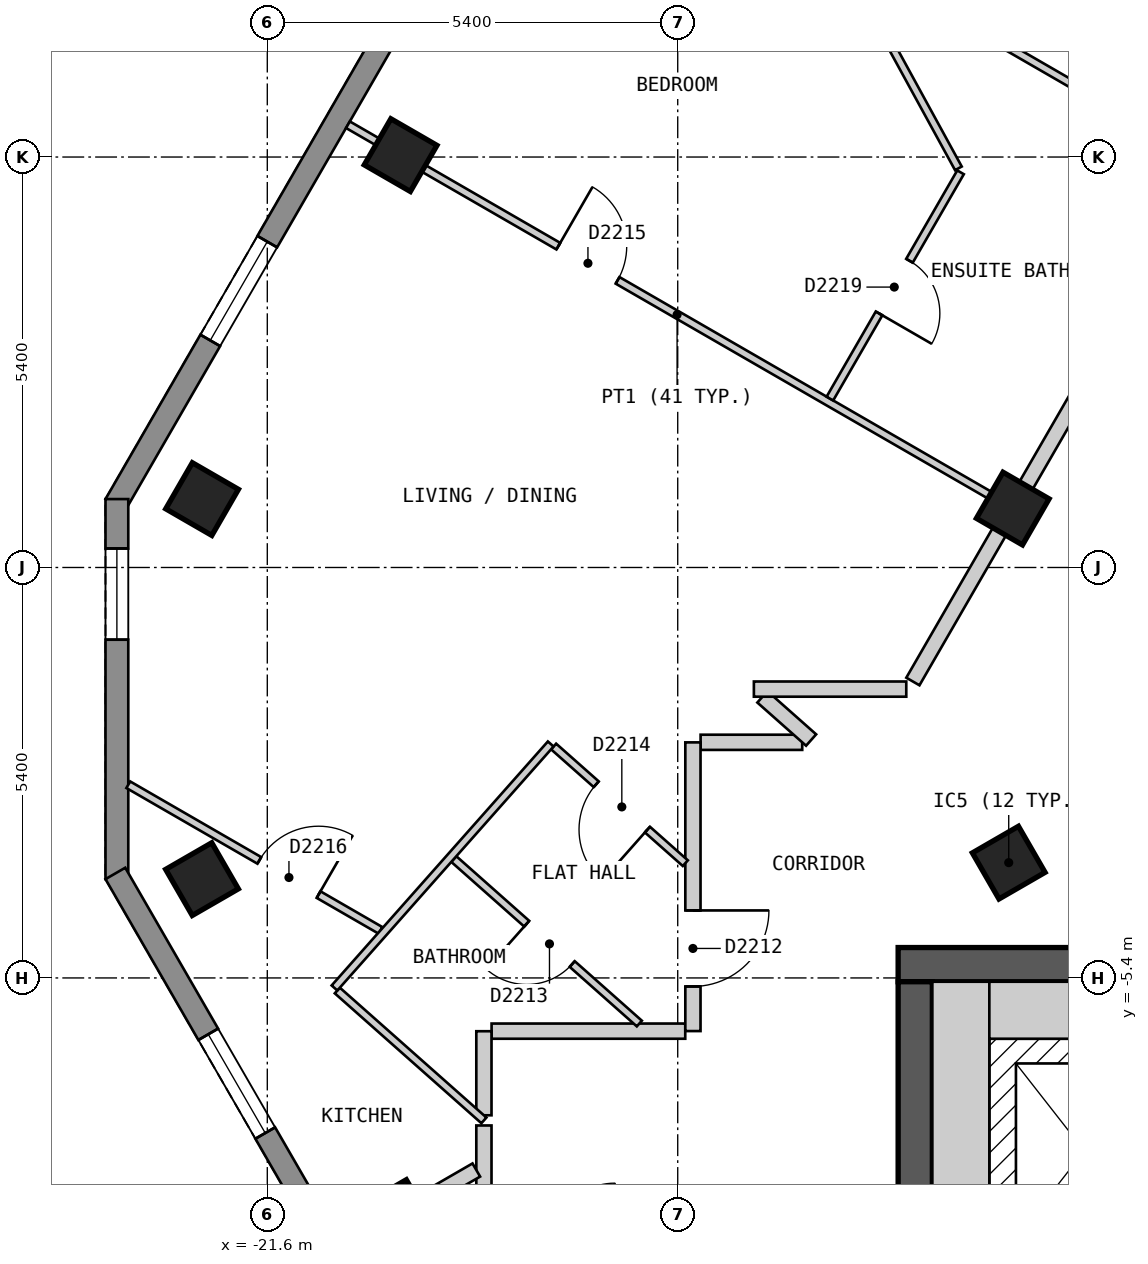
"""IFC4 building model, lengths in metres.
Left out: names, types, materials, properties, quantities, classifications, styles, units other than length and angle.
Written with IfcOpenShell. Run it as: python <this file> out.ifc"""

import sys

from ifc_helpers import new_model, si_unit, direction, frame, frame_2d, origin, origin_2d, place, context, subcontext, project, spatial, polyline, rectangle, outline, extrude, element, fill, save


model = new_model("IFC4")
c1 = context("Model", 3, precision=1e-05, world=origin(), true_north=direction((0.0, 1.0)))
c2 = subcontext(c1, "Body", "Model", "MODEL_VIEW")
j1 = project(units=[si_unit("LENGTHUNIT", "METRE"), si_unit("PLANEANGLEUNIT", "RADIAN")], contexts=[c1])
p1 = place(None, origin())
s1 = spatial("IfcSite", under=j1, at=p1, CompositionType="ELEMENT")
p2 = place(p1, origin())
s2 = spatial("IfcBuilding", under=s1, at=p2, CompositionType="ELEMENT")
p3 = place(p2, frame((0.0, 0.0, 223.8)))
s3 = spatial("IfcBuildingStorey", under=s2, at=p3, CompositionType="ELEMENT", Elevation=223.8)
for number, where, z_axis, x_axis in (
    (1, (-19.846, 5.425, 0.0), (0.0, 0.0, 1.0), (-0.5, -0.866, 0.0)),
    (2, (-22.458, 0.9, 0.0), (0.0, 0.0, 1.0), (-0.5, -0.866, 0.0)),
    (3, (-22.459, -4.1, 0.0), (0.0, 0.0, 1.0), (0.5, -0.866, 0.0)),
    (4, (-19.899, -8.533, 0.0), (0.0, 0.0, 1.0), (0.5, -0.866, 0.0)),
    (5, (-11.845, -3.883, 0.0), (0.0, 0.0, 1.0), (0.5, -0.866, 0.0)),
    (6, (-11.792, 0.775, 0.0), (0.0, 0.0, 1.0), (-0.5, -0.866, 0.0)),
):
    element("IfcColumn", number, at=place(p3, frame(where, z_axis=z_axis, x_axis=x_axis)), inside=s3, PredefinedType="COLUMN", context=c2, shape_type="SweptSolid", body=[
        extrude(rectangle(XDim=0.7, YDim=0.7, at=origin_2d()), origin(), (0.0, 0.0, 1.0), 3.0),
    ])
p4 = place(p3, frame((-13.3, -5.225, 0.0), z_axis=(0.0, 0.0, 1.0), x_axis=(1.0, 0.0, 0.0)))
e7 = element("IfcWall", 7, at=p4, inside=s3, PredefinedType="SHEAR", context=c2, shape_type="SweptSolid", body=[
    extrude(rectangle(XDim=26.6, YDim=0.45, at=frame_2d((13.3, 0.0))), origin(), (0.0, 0.0, 1.0), 2.7),
])
p5 = place(p4, frame((23.65, 0.0, 0.0)))
e8 = element("IfcOpeningElement", 8, at=p5, cuts=e7, PredefinedType="OPENING", context=c2, shape_type="SweptSolid", body=[
    extrude(rectangle(XDim=1.2, YDim=2.1, at=frame_2d((0.6, 1.05))), frame((0.0, 0.235, 0.0), z_axis=(0.0, -1.0, 0.0), x_axis=(1.0, 0.0, 0.0)), (0.0, 0.0, 1.0), 0.47),
])
p6 = place(p3, frame((-13.075, -18.55, 0.0), z_axis=(0.0, 0.0, 1.0), x_axis=(0.0, 1.0, 0.0)))
e9 = element("IfcWall", 9, at=p6, inside=s3, PredefinedType="SHEAR", context=c2, shape_type="SweptSolid", body=[
    extrude(rectangle(XDim=13.1, YDim=0.45, at=frame_2d((6.55, 0.0))), origin(), (0.0, 0.0, 1.0), 2.7),
])
p7 = place(p6, frame((4.35, 0.0, 0.0)))
e10 = element("IfcOpeningElement", 10, at=p7, cuts=e9, PredefinedType="OPENING", context=c2, shape_type="SweptSolid", body=[
    extrude(rectangle(XDim=1.2, YDim=2.1, at=frame_2d((0.6, 1.05))), frame((0.0, 0.235, 0.0), z_axis=(0.0, -1.0, 0.0), x_axis=(1.0, 0.0, 0.0)), (0.0, 0.0, 1.0), 0.47),
])
p8 = place(p3, frame((-12.514, 20.025, 0.0), z_axis=(0.0, 0.0, 1.0), x_axis=(-0.500003656944, -0.866023292436, 0.0)))
e11 = element("IfcWall", 11, at=p8, inside=s3, PredefinedType="SOLIDWALL", context=c2, shape_type="SweptSolid", body=[
    extrude(outline(polyline([(0.0, -0.15), (22.17, -0.15), (22.09, 0.15), (0.08, 0.15), (0.0, -0.15)])), origin(), (0.0, 0.0, 1.0), 2.7),
])
p9 = place(p8, frame((2.497, 0.0, 0.15)))
e12 = element("IfcOpeningElement", 12, at=p9, cuts=e11, PredefinedType="OPENING", context=c2, shape_type="SweptSolid", body=[
    extrude(rectangle(XDim=1.5, YDim=2.1, at=frame_2d((0.75, 1.05))), frame((0.0, 0.16, 0.0), z_axis=(0.0, -1.0, 0.0), x_axis=(1.0, 0.0, 0.0)), (0.0, 0.0, 1.0), 0.32),
])
p10 = place(p8, frame((7.722, 0.0, 0.15)))
e13 = element("IfcOpeningElement", 13, at=p10, cuts=e11, PredefinedType="OPENING", context=c2, shape_type="SweptSolid", body=[
    extrude(rectangle(XDim=1.5, YDim=2.1, at=frame_2d((0.75, 1.05))), frame((0.0, 0.16, 0.0), z_axis=(0.0, -1.0, 0.0), x_axis=(1.0, 0.0, 0.0)), (0.0, 0.0, 1.0), 0.32),
])
p11 = place(p8, frame((12.948, 0.0, 0.15)))
e14 = element("IfcOpeningElement", 14, at=p11, cuts=e11, PredefinedType="OPENING", context=c2, shape_type="SweptSolid", body=[
    extrude(rectangle(XDim=1.5, YDim=2.1, at=frame_2d((0.75, 1.05))), frame((0.0, 0.16, 0.0), z_axis=(0.0, -1.0, 0.0), x_axis=(1.0, 0.0, 0.0)), (0.0, 0.0, 1.0), 0.32),
])
p12 = place(p8, frame((18.173, 0.0, 0.15)))
e15 = element("IfcOpeningElement", 15, at=p12, cuts=e11, PredefinedType="OPENING", context=c2, shape_type="SweptSolid", body=[
    extrude(rectangle(XDim=1.5, YDim=2.1, at=frame_2d((0.75, 1.05))), frame((0.0, 0.16, 0.0), z_axis=(0.0, -1.0, 0.0), x_axis=(1.0, 0.0, 0.0)), (0.0, 0.0, 1.0), 0.32),
])
p13 = place(p3, frame((-23.579, 0.9, 0.0), z_axis=(0.0, 0.0, 1.0), x_axis=(0.0, -1.0, 0.0)))
e16 = element("IfcWall", 16, at=p13, inside=s3, PredefinedType="SOLIDWALL", context=c2, shape_type="SweptSolid", body=[
    extrude(outline(polyline([(0.0, -0.15), (5.0, -0.15), (4.92, 0.15), (0.08, 0.15), (0.0, -0.15)])), origin(), (0.0, 0.0, 1.0), 2.7),
])
p14 = place(p13, frame((0.65, 0.0, 0.15)))
e17 = element("IfcOpeningElement", 17, at=p14, cuts=e16, PredefinedType="OPENING", context=c2, shape_type="SweptSolid", body=[
    extrude(rectangle(XDim=1.2, YDim=2.1, at=frame_2d((0.6, 1.05))), frame((0.0, 0.16, 0.0), z_axis=(0.0, -1.0, 0.0), x_axis=(1.0, 0.0, 0.0)), (0.0, 0.0, 1.0), 0.32),
])
p15 = place(p3, frame((-23.599, -4.025, 0.0), z_axis=(0.0, 0.0, 1.0), x_axis=(0.500012653391, -0.866018098222, 0.0)))
e18 = element("IfcWall", 18, at=p15, inside=s3, PredefinedType="SOLIDWALL", context=c2, shape_type="SweptSolid", body=[
    extrude(outline(polyline([(0.0, -0.15), (16.628, -0.15), (16.548, 0.15), (0.08, 0.15), (0.0, -0.15)])), origin(), (0.0, 0.0, 1.0), 2.7),
])
p16 = place(p15, frame((2.444, 0.0, 0.15)))
e19 = element("IfcOpeningElement", 19, at=p16, cuts=e18, PredefinedType="OPENING", context=c2, shape_type="SweptSolid", body=[
    extrude(rectangle(XDim=1.5, YDim=2.1, at=frame_2d((0.75, 1.05))), frame((0.0, 0.16, 0.0), z_axis=(0.0, -1.0, 0.0), x_axis=(1.0, 0.0, 0.0)), (0.0, 0.0, 1.0), 0.32),
])
p17 = place(p15, frame((7.564, 0.0, 0.15)))
e20 = element("IfcOpeningElement", 20, at=p17, cuts=e18, PredefinedType="OPENING", context=c2, shape_type="SweptSolid", body=[
    extrude(rectangle(XDim=1.5, YDim=2.1, at=frame_2d((0.75, 1.05))), frame((0.0, 0.16, 0.0), z_axis=(0.0, -1.0, 0.0), x_axis=(1.0, 0.0, 0.0)), (0.0, 0.0, 1.0), 0.32),
])
p18 = place(p15, frame((12.682, 0.0, 0.15)))
e21 = element("IfcOpeningElement", 21, at=p18, cuts=e18, PredefinedType="OPENING", context=c2, shape_type="SweptSolid", body=[
    extrude(rectangle(XDim=1.5, YDim=2.1, at=frame_2d((0.75, 1.05))), frame((0.0, 0.16, 0.0), z_axis=(0.0, -1.0, 0.0), x_axis=(1.0, 0.0, 0.0)), (0.0, 0.0, 1.0), 0.32),
])
p19 = place(p3, frame((-18.75, -7.341, 0.0), z_axis=(0.0, 0.0, 1.0), x_axis=(0.0, -1.0, 0.0)))
e22 = element("IfcWall", 22, at=p19, inside=s3, PredefinedType="PARTITIONING", context=c2, shape_type="SweptSolid", body=[
    extrude(rectangle(XDim=1.458, YDim=0.2, at=frame_2d((0.729, 0.0))), origin(), (0.0, 0.0, 1.0), 2.7),
])
p20 = place(p3, frame((-18.649, -6.1, 0.0), z_axis=(0.0, 0.0, 1.0), x_axis=(1.0, 0.0, 0.0)))
e23 = element("IfcWall", 23, at=p20, inside=s3, PredefinedType="PARTITIONING", context=c2, shape_type="SweptSolid", body=[
    extrude(rectangle(XDim=2.548, YDim=0.2, at=frame_2d((1.274, 0.0))), origin(), (0.0, 0.0, 1.0), 2.7),
])
p21 = place(p3, frame((-15.899, -2.3, 0.0), z_axis=(0.0, 0.0, 1.0), x_axis=(1.0, 0.0, 0.0)))
e24 = element("IfcWall", 24, at=p21, inside=s3, PredefinedType="PARTITIONING", context=c2, shape_type="SweptSolid", body=[
    extrude(rectangle(XDim=1.337, YDim=0.2, at=frame_2d((0.668, 0.0))), origin(), (0.0, 0.0, 1.0), 2.7),
])
p22 = place(p3, frame((-13.106, -1.5, 0.0), z_axis=(0.0, 0.0, 1.0), x_axis=(0.500025705601, 0.86601056214, 0.0)))
e25 = element("IfcWall", 25, at=p22, inside=s3, PredefinedType="PARTITIONING", context=c2, shape_type="SweptSolid", body=[
    extrude(rectangle(XDim=7.735, YDim=0.2, at=frame_2d((3.868, 0.0))), origin(), (0.0, 0.0, 1.0), 2.7),
])
p23 = place(p3, frame((-16.0, -6.099, 0.0), z_axis=(0.0, 0.0, 1.0), x_axis=(0.0, 1.0, 0.0)))
e26 = element("IfcWall", 26, at=p23, inside=s3, PredefinedType="PARTITIONING", context=c2, shape_type="SweptSolid", body=[
    extrude(rectangle(XDim=3.798, YDim=0.2, at=frame_2d((1.899, 0.0))), origin(), (0.0, 0.0, 1.0), 2.7),
])
p24 = place(p23, frame((0.587, 0.0, 0.0)))
e27 = element("IfcOpeningElement", 27, at=p24, cuts=e26, PredefinedType="OPENING", context=c2, shape_type="SweptSolid", body=[
    extrude(rectangle(XDim=1.0, YDim=2.1, at=frame_2d((0.5, 1.05))), frame((0.0, 0.11, 0.0), z_axis=(0.0, -1.0, 0.0), x_axis=(1.0, 0.0, 0.0)), (0.0, 0.0, 1.0), 0.22),
])
p25 = place(p3, frame((-18.75, -7.207, 0.0), z_axis=(0.0, 0.0, 1.0), x_axis=(0.0, 1.0, 0.0)))
e28 = element("IfcWall", 28, at=p25, inside=s3, PredefinedType="PARTITIONING", context=c2, shape_type="SweptSolid", body=[
    extrude(rectangle(XDim=1.106, YDim=0.2, at=frame_2d((0.553, 0.0))), origin(), (0.0, 0.0, 1.0), 2.7),
])
p26 = place(p3, frame((-14.012, 8.0, 0.0), z_axis=(0.0, 0.0, 1.0), x_axis=(0.480183343847, -0.877168145963, 0.0)))
e29 = element("IfcWall", 29, at=p26, inside=s3, PredefinedType="PARTITIONING", context=c2, shape_type="SweptSolid", body=[
    extrude(rectangle(XDim=3.134, YDim=0.1, at=frame_2d((1.567, 0.0))), origin(), (0.0, 0.0, 1.0), 2.7),
])
p27 = place(p3, frame((-20.539, 5.825, 0.0), z_axis=(0.0, 0.0, 1.0), x_axis=(0.866089650643, -0.499888704662, 0.0)))
e30 = element("IfcWall", 30, at=p27, inside=s3, PredefinedType="PARTITIONING", context=c2, shape_type="SweptSolid", body=[
    extrude(rectangle(XDim=10.0, YDim=0.1, at=frame_2d((5.0, 0.0))), origin(), (0.0, 0.0, 1.0), 2.7),
])
p28 = place(p27, frame((3.196, 0.0, 0.0)))
e31 = element("IfcOpeningElement", 31, at=p28, cuts=e30, PredefinedType="OPENING", context=c2, shape_type="SweptSolid", body=[
    extrude(rectangle(XDim=0.9, YDim=2.1, at=frame_2d((0.45, 1.05))), frame((0.0, 0.06, 0.0), z_axis=(0.0, -1.0, 0.0), x_axis=(1.0, 0.0, 0.0)), (0.0, 0.0, 1.0), 0.12),
])
p29 = place(p3, frame((-23.429, -2.858, 0.0), z_axis=(0.0, 0.0, 1.0), x_axis=(0.8659754619, -0.500086491905, 0.0)))
e32 = element("IfcWall", 32, at=p29, inside=s3, PredefinedType="PARTITIONING", context=c2, shape_type="SweptSolid", body=[
    extrude(rectangle(XDim=3.831, YDim=0.1, at=frame_2d((1.916, 0.0))), origin(), (0.0, 0.0, 1.0), 2.7),
])
p30 = place(p29, frame((1.991, 0.0, 0.0)))
e33 = element("IfcOpeningElement", 33, at=p30, cuts=e32, PredefinedType="OPENING", context=c2, shape_type="SweptSolid", body=[
    extrude(rectangle(XDim=0.9, YDim=2.1, at=frame_2d((0.45, 1.05))), frame((0.0, 0.06, 0.0), z_axis=(0.0, -1.0, 0.0), x_axis=(1.0, 0.0, 0.0)), (0.0, 0.0, 1.0), 0.12),
])
p31 = place(p3, frame((-17.926, 10.35, 0.0), z_axis=(0.0, 0.0, 1.0), x_axis=(0.866018411306, -0.500012111133, 0.0)))
e34 = element("IfcWall", 34, at=p31, inside=s3, PredefinedType="PARTITIONING", context=c2, shape_type="SweptSolid", body=[
    extrude(rectangle(XDim=9.898, YDim=0.1, at=frame_2d((4.949, 0.0))), origin(), (0.0, 0.0, 1.0), 2.7),
])
p32 = place(p31, frame((1.83, 0.0, 0.0)))
e35 = element("IfcOpeningElement", 35, at=p32, cuts=e34, PredefinedType="OPENING", context=c2, shape_type="SweptSolid", body=[
    extrude(rectangle(XDim=0.9, YDim=2.1, at=frame_2d((0.45, 1.05))), frame((0.0, 0.06, 0.0), z_axis=(0.0, -1.0, 0.0), x_axis=(1.0, 0.0, 0.0)), (0.0, 0.0, 1.0), 0.12),
])
p33 = place(p3, frame((-17.833, -2.355, 0.0), z_axis=(0.0, 0.0, 1.0), x_axis=(0.748577710953, -0.663047065196, 0.0)))
e36 = element("IfcWall", 36, at=p33, inside=s3, PredefinedType="PARTITIONING", context=c2, shape_type="SweptSolid", body=[
    extrude(rectangle(XDim=2.315, YDim=0.1, at=frame_2d((1.157, 0.0))), origin(), (0.0, 0.0, 1.0), 2.7),
])
p34 = place(p33, frame((0.749, 0.0, 0.0)))
e37 = element("IfcOpeningElement", 37, at=p34, cuts=e36, PredefinedType="OPENING", context=c2, shape_type="SweptSolid", body=[
    extrude(rectangle(XDim=0.9, YDim=2.1, at=frame_2d((0.45, 1.05))), frame((0.0, 0.06, 0.0), z_axis=(0.0, -1.0, 0.0), x_axis=(1.0, 0.0, 0.0)), (0.0, 0.0, 1.0), 0.12),
])
p35 = place(p3, frame((-19.146, -3.836, 0.0), z_axis=(0.0, 0.0, 1.0), x_axis=(0.748267567437, -0.663397051186, 0.0)))
e38 = element("IfcWall", 38, at=p35, inside=s3, PredefinedType="PARTITIONING", context=c2, shape_type="SweptSolid", body=[
    extrude(rectangle(XDim=3.262, YDim=0.1, at=frame_2d((1.631, 0.0))), origin(), (0.0, 0.0, 1.0), 2.7),
])
p36 = place(p35, frame((1.282, 0.0, 0.0)))
e39 = element("IfcOpeningElement", 39, at=p36, cuts=e38, PredefinedType="OPENING", context=c2, shape_type="SweptSolid", body=[
    extrude(rectangle(XDim=0.8, YDim=2.1, at=frame_2d((0.4, 1.05))), frame((0.0, 0.06, 0.0), z_axis=(0.0, -1.0, 0.0), x_axis=(1.0, 0.0, 0.0)), (0.0, 0.0, 1.0), 0.12),
])
p37 = place(p3, frame((-20.679, -5.565, 0.0), z_axis=(0.0, 0.0, 1.0), x_axis=(0.748495475416, -0.663139897217, 0.0)))
e40 = element("IfcWall", 40, at=p37, inside=s3, PredefinedType="PARTITIONING", context=c2, shape_type="SweptSolid", body=[
    extrude(rectangle(XDim=2.577, YDim=0.1, at=frame_2d((1.289, 0.0))), origin(), (0.0, 0.0, 1.0), 2.7),
])
p38 = place(p3, frame((-14.198, 2.222, 0.0), z_axis=(0.0, 0.0, 1.0), x_axis=(0.500042121486, 0.866001083567, 0.0)))
e41 = element("IfcWall", 41, at=p38, inside=s3, PredefinedType="PARTITIONING", context=c2, shape_type="SweptSolid", body=[
    extrude(rectangle(XDim=3.438, YDim=0.1, at=frame_2d((1.719, 0.0))), origin(), (0.0, 0.0, 1.0), 2.7),
])
p39 = place(p38, frame((1.294, 0.0, 0.0)))
e42 = element("IfcOpeningElement", 42, at=p39, cuts=e41, PredefinedType="OPENING", context=c2, shape_type="SweptSolid", body=[
    extrude(rectangle(XDim=0.8, YDim=2.1, at=frame_2d((0.4, 1.05))), frame((0.0, 0.06, 0.0), z_axis=(0.0, -1.0, 0.0), x_axis=(1.0, 0.0, 0.0)), (0.0, 0.0, 1.0), 0.12),
])
p40 = place(p3, frame((-20.716, -5.532, 0.0), z_axis=(0.0, 0.0, 1.0), x_axis=(0.663278535613, 0.748372623895, 0.0)))
e43 = element("IfcWall", 43, at=p40, inside=s3, PredefinedType="PARTITIONING", context=c2, shape_type="SweptSolid", body=[
    extrude(rectangle(XDim=4.289, YDim=0.1, at=frame_2d((2.145, 0.0))), origin(), (0.0, 0.0, 1.0), 2.7),
])
p41 = place(p3, frame((-15.086, -1.702, 0.0), z_axis=(0.0, 0.0, 1.0), x_axis=(0.748305129876, -0.663354680846, 0.0)))
e44 = element("IfcWall", 44, at=p41, inside=s3, PredefinedType="PARTITIONING", context=c2, shape_type="SweptSolid", body=[
    extrude(rectangle(XDim=0.856, YDim=0.2, at=frame_2d((0.428, 0.0))), origin(), (0.0, 0.0, 1.0), 2.7),
])
p42 = place(p3, frame((-15.198, -1.6, 0.0), z_axis=(0.0, 0.0, 1.0), x_axis=(1.0, 0.0, 0.0)))
e45 = element("IfcWall", 45, at=p42, inside=s3, PredefinedType="PARTITIONING", context=c2, shape_type="SweptSolid", body=[
    extrude(rectangle(XDim=2.005, YDim=0.2, at=frame_2d((1.002, 0.0))), origin(), (0.0, 0.0, 1.0), 2.7),
])
p43 = place(p3, frame((-20.592, -8.933, 0.0), z_axis=(0.0, 0.0, 1.0), x_axis=(0.865941000796, 0.500146161777, 0.0)))
e46 = element("IfcWall", 46, at=p43, inside=s3, PredefinedType="PARTITIONING", context=c2, shape_type="SweptSolid", body=[
    extrude(rectangle(XDim=2.012, YDim=0.2, at=frame_2d((1.006, 0.0))), origin(), (0.0, 0.0, 1.0), 2.7),
])
p44 = place(p3, frame((-12.475, -9.15, 0.0), z_axis=(0.0, 0.0, 1.0), x_axis=(0.0, 1.0, 0.0)))
e47 = element("IfcWall", 47, at=p44, inside=s3, PredefinedType="SOLIDWALL", context=c2, shape_type="SweptSolid", body=[
    extrude(rectangle(XDim=3.7, YDim=0.75, at=frame_2d((1.85, 0.0))), origin(), (0.0, 0.0, 1.0), 2.7),
])
p45 = place(p3, frame((-12.1, -5.825, 0.0), z_axis=(0.0, 0.0, 1.0), x_axis=(1.0, 0.0, 0.0)))
e48 = element("IfcWall", 48, at=p45, inside=s3, PredefinedType="SOLIDWALL", context=c2, shape_type="SweptSolid", body=[
    extrude(rectangle(XDim=5.4, YDim=0.75, at=frame_2d((2.7, 0.0))), origin(), (0.0, 0.0, 1.0), 2.7),
])
p46 = place(p12, origin())
e49 = element("IfcWindow", 49, at=p46, inside=s3, PartitioningType="SINGLE_PANEL", PredefinedType="WINDOW", context=c2, shape_type="SweptSolid", body=[
    extrude(rectangle(XDim=1.5, YDim=2.1, at=frame_2d((0.75, 1.05))), frame((0.0, 0.03, 0.0), z_axis=(0.0, -1.0, 0.0), x_axis=(1.0, 0.0, 0.0)), (0.0, 0.0, 1.0), 0.06),
])
fill(e15, e49)
p47 = place(p14, origin())
e50 = element("IfcWindow", 50, at=p47, inside=s3, PartitioningType="SINGLE_PANEL", PredefinedType="WINDOW", context=c2, shape_type="SweptSolid", body=[
    extrude(rectangle(XDim=1.2, YDim=2.1, at=frame_2d((0.6, 1.05))), frame((0.0, 0.03, 0.0), z_axis=(0.0, -1.0, 0.0), x_axis=(1.0, 0.0, 0.0)), (0.0, 0.0, 1.0), 0.06),
])
fill(e17, e50)
p48 = place(p16, origin())
e51 = element("IfcWindow", 51, at=p48, inside=s3, PartitioningType="SINGLE_PANEL", PredefinedType="WINDOW", context=c2, shape_type="SweptSolid", body=[
    extrude(rectangle(XDim=1.5, YDim=2.1, at=frame_2d((0.75, 1.05))), frame((0.0, 0.03, 0.0), z_axis=(0.0, -1.0, 0.0), x_axis=(1.0, 0.0, 0.0)), (0.0, 0.0, 1.0), 0.06),
])
fill(e19, e51)
p49 = place(p24, origin())
e52 = element("IfcDoor", 52, at=p49, inside=s3, OperationType="SINGLE_SWING_RIGHT", PredefinedType="DOOR", context=c2, shape_type="SweptSolid", body=[
    extrude(rectangle(XDim=1.0, YDim=2.1, at=frame_2d((0.5, 1.05))), frame((0.0, 0.025, 0.0), z_axis=(0.0, -1.0, 0.0), x_axis=(1.0, 0.0, 0.0)), (0.0, 0.0, 1.0), 0.05),
])
fill(e27, e52)
p50 = place(p36, origin())
e53 = element("IfcDoor", 53, at=p50, inside=s3, OperationType="SINGLE_SWING_LEFT", PredefinedType="DOOR", context=c2, shape_type="SweptSolid", body=[
    extrude(rectangle(XDim=0.8, YDim=2.1, at=frame_2d((0.4, 1.05))), frame((0.0, 0.025, 0.0), z_axis=(0.0, -1.0, 0.0), x_axis=(1.0, 0.0, 0.0)), (0.0, 0.0, 1.0), 0.05),
])
fill(e39, e53)
p51 = place(p34, origin())
e54 = element("IfcDoor", 54, at=p51, inside=s3, OperationType="SINGLE_SWING_RIGHT", PredefinedType="DOOR", context=c2, shape_type="SweptSolid", body=[
    extrude(rectangle(XDim=0.9, YDim=2.1, at=frame_2d((0.45, 1.05))), frame((0.0, 0.025, 0.0), z_axis=(0.0, -1.0, 0.0), x_axis=(1.0, 0.0, 0.0)), (0.0, 0.0, 1.0), 0.05),
])
fill(e37, e54)
p52 = place(p28, origin())
e55 = element("IfcDoor", 55, at=p52, inside=s3, OperationType="SINGLE_SWING_LEFT", PredefinedType="DOOR", context=c2, shape_type="SweptSolid", body=[
    extrude(rectangle(XDim=0.9, YDim=2.1, at=frame_2d((0.45, 1.05))), frame((0.0, 0.025, 0.0), z_axis=(0.0, -1.0, 0.0), x_axis=(1.0, 0.0, 0.0)), (0.0, 0.0, 1.0), 0.05),
])
fill(e31, e55)
p53 = place(p30, origin())
e56 = element("IfcDoor", 56, at=p53, inside=s3, OperationType="SINGLE_SWING_RIGHT", PredefinedType="DOOR", context=c2, shape_type="SweptSolid", body=[
    extrude(rectangle(XDim=0.9, YDim=2.1, at=frame_2d((0.45, 1.05))), frame((0.0, 0.025, 0.0), z_axis=(0.0, -1.0, 0.0), x_axis=(1.0, 0.0, 0.0)), (0.0, 0.0, 1.0), 0.05),
])
fill(e33, e56)
p54 = place(p39, origin())
e57 = element("IfcDoor", 57, at=p54, inside=s3, OperationType="SINGLE_SWING_LEFT", PredefinedType="DOOR", context=c2, shape_type="SweptSolid", body=[
    extrude(rectangle(XDim=0.8, YDim=2.1, at=frame_2d((0.4, 1.05))), frame((0.0, 0.025, 0.0), z_axis=(0.0, -1.0, 0.0), x_axis=(1.0, 0.0, 0.0)), (0.0, 0.0, 1.0), 0.05),
])
fill(e42, e57)
save(model, sys.argv[1])
